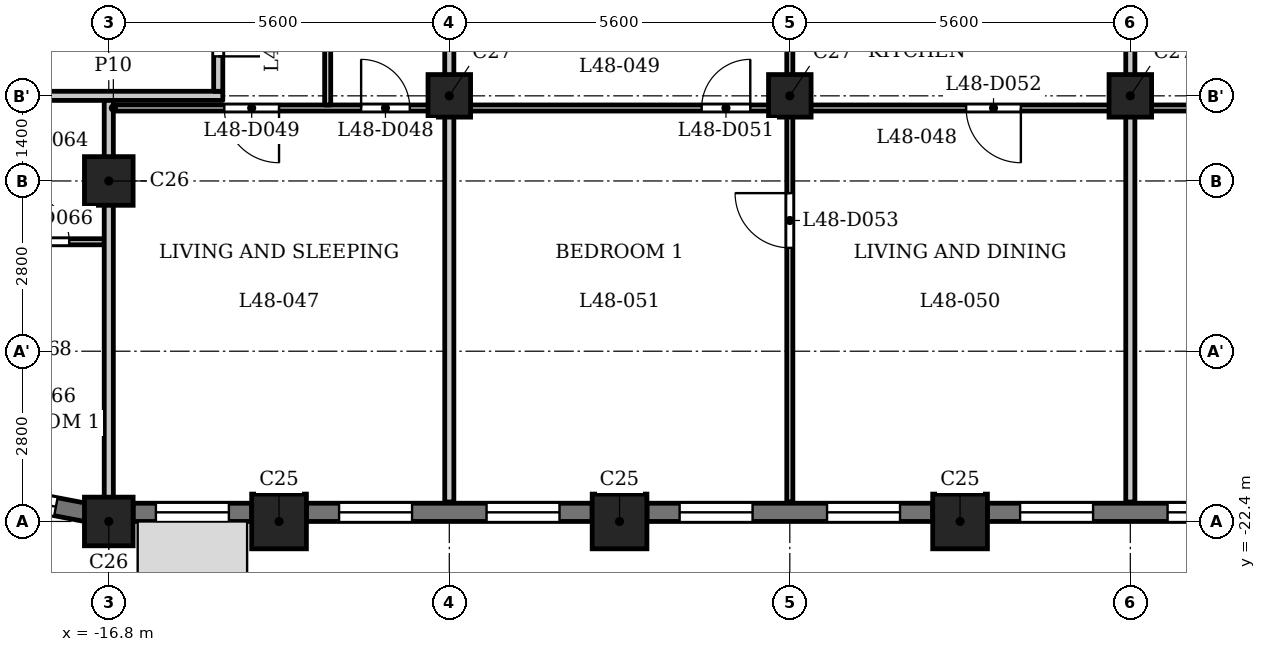
"""IFC4 building model, lengths in metres.
Left out: names, types, materials, properties, quantities, classifications, styles, units other than length and angle.
Written with IfcOpenShell. Run it as: python <this file> out.ifc"""

import sys

from ifc_helpers import new_model, si_unit, direction, frame, frame_2d, origin, origin_2d, place, context, subcontext, project, spatial, rectangle, extrude, element, fill, save


model = new_model("IFC4")
c1 = context("Model", 3, precision=1e-05, world=origin(), true_north=direction((0.0, 1.0)))
c2 = subcontext(c1, "Body", "Model", "MODEL_VIEW")
j1 = project(units=[si_unit("LENGTHUNIT", "METRE"), si_unit("PLANEANGLEUNIT", "RADIAN")], contexts=[c1])
p1 = place(None, origin())
s1 = spatial("IfcSite", under=j1, at=p1, CompositionType="ELEMENT")
p2 = place(p1, origin())
s2 = spatial("IfcBuilding", under=s1, at=p2, CompositionType="ELEMENT")
p3 = place(p2, frame((0.0, 0.0, 188.9)))
s3 = spatial("IfcBuildingStorey", under=s2, at=p3, CompositionType="ELEMENT", Elevation=188.9)
for number, where, z_axis, x_axis in (
    (1, (-14.0, -22.4, 0.0), (0.0, 0.0, 1.0), (1.0, 0.0, 0.0)),
    (2, (-8.4, -22.4, 0.0), (0.0, 0.0, 1.0), (1.0, 0.0, 0.0)),
    (3, (-2.8, -22.4, 0.0), (0.0, 0.0, 1.0), (1.0, 0.0, 0.0)),
):
    element("IfcColumn", number, at=place(p3, frame(where, z_axis=z_axis, x_axis=x_axis)), inside=s3, PredefinedType="COLUMN", context=c2, shape_type="SweptSolid", body=[
        extrude(rectangle(XDim=0.9, YDim=0.9, at=origin_2d()), origin(), (0.0, 0.0, 1.0), 3.5),
    ])
for number, where, z_axis, x_axis in (
    (4, (-16.8, -22.4, 0.0), (0.0, 0.0, 1.0), (1.0, 0.0, 0.0)),
    (5, (-16.8, -16.8, 0.0), (0.0, 0.0, 1.0), (1.0, 0.0, 0.0)),
):
    element("IfcColumn", number, at=place(p3, frame(where, z_axis=z_axis, x_axis=x_axis)), inside=s3, PredefinedType="COLUMN", context=c2, shape_type="SweptSolid", body=[
        extrude(rectangle(XDim=0.8, YDim=0.8, at=origin_2d()), origin(), (0.0, 0.0, 1.0), 3.5),
    ])
for number, where, z_axis, x_axis in (
    (6, (-11.2, -15.4, 0.0), (0.0, 0.0, 1.0), (1.0, 0.0, 0.0)),
    (7, (-5.6, -15.4, 0.0), (0.0, 0.0, 1.0), (1.0, 0.0, 0.0)),
    (8, (0.0, -15.4, 0.0), (0.0, 0.0, 1.0), (1.0, 0.0, 0.0)),
):
    element("IfcColumn", number, at=place(p3, frame(where, z_axis=z_axis, x_axis=x_axis)), inside=s3, PredefinedType="COLUMN", context=c2, shape_type="SweptSolid", body=[
        extrude(rectangle(XDim=0.7, YDim=0.7, at=origin_2d()), origin(), (0.0, 0.0, 1.0), 3.5),
    ])
p4 = place(p3, frame((-18.946, -21.914, 0.0), z_axis=(0.0, 0.0, 1.0), x_axis=(0.98230529033, -0.187286722942, 0.0)))
e9 = element("IfcWall", 9, at=p4, inside=s3, PredefinedType="SOLIDWALL", context=c2, shape_type="SweptSolid", body=[
    extrude(rectangle(XDim=1.799, YDim=0.3, at=frame_2d((0.899, 0.0))), origin(), (0.0, 0.0, 1.0), 2.5),
])
p5 = place(p4, frame((0.5, 0.0, 0.6)))
e10 = element("IfcOpeningElement", 10, at=p5, cuts=e9, PredefinedType="OPENING", context=c2, shape_type="SweptSolid", body=[
    extrude(rectangle(XDim=0.8, YDim=1.55, at=frame_2d((0.4, 0.775))), frame((0.0, 0.16, 0.0), z_axis=(0.0, -1.0, 0.0), x_axis=(1.0, 0.0, 0.0)), (0.0, 0.0, 1.0), 0.32),
])
p6 = place(p3, frame((-16.4, -22.25, 0.0), z_axis=(0.0, 0.0, 1.0), x_axis=(1.0, 0.0, 0.0)))
e11 = element("IfcWall", 11, at=p6, inside=s3, PredefinedType="SOLIDWALL", context=c2, shape_type="SweptSolid", body=[
    extrude(rectangle(XDim=1.95, YDim=0.3, at=frame_2d((0.975, 0.0))), origin(), (0.0, 0.0, 1.0), 2.5),
])
p7 = place(p6, frame((0.375, 0.0, 0.6)))
e12 = element("IfcOpeningElement", 12, at=p7, cuts=e11, PredefinedType="OPENING", context=c2, shape_type="SweptSolid", body=[
    extrude(rectangle(XDim=1.2, YDim=1.55, at=frame_2d((0.6, 0.775))), frame((0.0, 0.16, 0.0), z_axis=(0.0, -1.0, 0.0), x_axis=(1.0, 0.0, 0.0)), (0.0, 0.0, 1.0), 0.32),
])
p8 = place(p3, frame((-13.55, -22.25, 0.0), z_axis=(0.0, 0.0, 1.0), x_axis=(1.0, 0.0, 0.0)))
e13 = element("IfcWall", 13, at=p8, inside=s3, PredefinedType="SOLIDWALL", context=c2, shape_type="SweptSolid", body=[
    extrude(rectangle(XDim=4.7, YDim=0.3, at=frame_2d((2.35, 0.0))), origin(), (0.0, 0.0, 1.0), 2.5),
])
p9 = place(p8, frame((0.538, 0.0, 0.6)))
e14 = element("IfcOpeningElement", 14, at=p9, cuts=e13, PredefinedType="OPENING", context=c2, shape_type="SweptSolid", body=[
    extrude(rectangle(XDim=1.2, YDim=1.55, at=frame_2d((0.6, 0.775))), frame((0.0, 0.16, 0.0), z_axis=(0.0, -1.0, 0.0), x_axis=(1.0, 0.0, 0.0)), (0.0, 0.0, 1.0), 0.32),
])
p10 = place(p8, frame((2.962, 0.0, 0.6)))
e15 = element("IfcOpeningElement", 15, at=p10, cuts=e13, PredefinedType="OPENING", context=c2, shape_type="SweptSolid", body=[
    extrude(rectangle(XDim=1.2, YDim=1.55, at=frame_2d((0.6, 0.775))), frame((0.0, 0.16, 0.0), z_axis=(0.0, -1.0, 0.0), x_axis=(1.0, 0.0, 0.0)), (0.0, 0.0, 1.0), 0.32),
])
p11 = place(p3, frame((-7.95, -22.25, 0.0), z_axis=(0.0, 0.0, 1.0), x_axis=(1.0, 0.0, 0.0)))
e16 = element("IfcWall", 16, at=p11, inside=s3, PredefinedType="SOLIDWALL", context=c2, shape_type="SweptSolid", body=[
    extrude(rectangle(XDim=4.7, YDim=0.3, at=frame_2d((2.35, 0.0))), origin(), (0.0, 0.0, 1.0), 2.5),
])
p12 = place(p11, frame((0.538, 0.0, 0.6)))
e17 = element("IfcOpeningElement", 17, at=p12, cuts=e16, PredefinedType="OPENING", context=c2, shape_type="SweptSolid", body=[
    extrude(rectangle(XDim=1.2, YDim=1.55, at=frame_2d((0.6, 0.775))), frame((0.0, 0.16, 0.0), z_axis=(0.0, -1.0, 0.0), x_axis=(1.0, 0.0, 0.0)), (0.0, 0.0, 1.0), 0.32),
])
p13 = place(p11, frame((2.962, 0.0, 0.6)))
e18 = element("IfcOpeningElement", 18, at=p13, cuts=e16, PredefinedType="OPENING", context=c2, shape_type="SweptSolid", body=[
    extrude(rectangle(XDim=1.2, YDim=1.55, at=frame_2d((0.6, 0.775))), frame((0.0, 0.16, 0.0), z_axis=(0.0, -1.0, 0.0), x_axis=(1.0, 0.0, 0.0)), (0.0, 0.0, 1.0), 0.32),
])
p14 = place(p3, frame((-2.35, -22.25, 0.0), z_axis=(0.0, 0.0, 1.0), x_axis=(1.0, 0.0, 0.0)))
e19 = element("IfcWall", 19, at=p14, inside=s3, PredefinedType="SOLIDWALL", context=c2, shape_type="SweptSolid", body=[
    extrude(rectangle(XDim=4.7, YDim=0.3, at=frame_2d((2.35, 0.0))), origin(), (0.0, 0.0, 1.0), 2.5),
])
p15 = place(p14, frame((0.538, 0.0, 0.6)))
e20 = element("IfcOpeningElement", 20, at=p15, cuts=e19, PredefinedType="OPENING", context=c2, shape_type="SweptSolid", body=[
    extrude(rectangle(XDim=1.2, YDim=1.55, at=frame_2d((0.6, 0.775))), frame((0.0, 0.16, 0.0), z_axis=(0.0, -1.0, 0.0), x_axis=(1.0, 0.0, 0.0)), (0.0, 0.0, 1.0), 0.32),
])
p16 = place(p14, frame((2.962, 0.0, 0.6)))
e21 = element("IfcOpeningElement", 21, at=p16, cuts=e19, PredefinedType="OPENING", context=c2, shape_type="SweptSolid", body=[
    extrude(rectangle(XDim=1.2, YDim=1.55, at=frame_2d((0.6, 0.775))), frame((0.0, 0.16, 0.0), z_axis=(0.0, -1.0, 0.0), x_axis=(1.0, 0.0, 0.0)), (0.0, 0.0, 1.0), 0.32),
])
p17 = place(p3, frame((-23.594, -17.8, 0.0), z_axis=(0.0, 0.0, 1.0), x_axis=(1.0, 0.0, 0.0)))
e22 = element("IfcWall", 22, at=p17, inside=s3, PredefinedType="PARTITIONING", context=c2, shape_type="SweptSolid", body=[
    extrude(rectangle(XDim=6.719, YDim=0.1, at=frame_2d((3.359, 0.0))), origin(), (0.0, 0.0, 1.0), 3.2),
])
p18 = place(p17, frame((5.344, 0.0, 0.0)))
e23 = element("IfcOpeningElement", 23, at=p18, cuts=e22, PredefinedType="OPENING", context=c2, shape_type="SweptSolid", body=[
    extrude(rectangle(XDim=0.8, YDim=2.1, at=frame_2d((0.4, 1.05))), frame((0.0, 0.06, 0.0), z_axis=(0.0, -1.0, 0.0), x_axis=(1.0, 0.0, 0.0)), (0.0, 0.0, 1.0), 0.12),
])
p19 = place(p17, frame((1.126, 0.0, 0.0)))
e24 = element("IfcOpeningElement", 24, at=p19, cuts=e22, PredefinedType="OPENING", context=c2, shape_type="SweptSolid", body=[
    extrude(rectangle(XDim=0.9, YDim=2.1, at=frame_2d((0.45, 1.05))), frame((0.0, 0.06, 0.0), z_axis=(0.0, -1.0, 0.0), x_axis=(1.0, 0.0, 0.0)), (0.0, 0.0, 1.0), 0.12),
])
p20 = place(p3, frame((-16.725, -15.6, 0.0), z_axis=(0.0, 0.0, 1.0), x_axis=(1.0, 0.0, 0.0)))
e25 = element("IfcWall", 25, at=p20, inside=s3, PredefinedType="PARTITIONING", context=c2, shape_type="SweptSolid", body=[
    extrude(rectangle(XDim=33.45, YDim=0.1, at=frame_2d((16.725, 0.0))), origin(), (0.0, 0.0, 1.0), 3.2),
])
p21 = place(p20, frame((4.075, 0.0, 0.0)))
e26 = element("IfcOpeningElement", 26, at=p21, cuts=e25, PredefinedType="OPENING", context=c2, shape_type="SweptSolid", body=[
    extrude(rectangle(XDim=0.8, YDim=2.1, at=frame_2d((0.4, 1.05))), frame((0.0, 0.06, 0.0), z_axis=(0.0, -1.0, 0.0), x_axis=(1.0, 0.0, 0.0)), (0.0, 0.0, 1.0), 0.12),
])
p22 = place(p20, frame((1.825, 0.0, 0.0)))
e27 = element("IfcOpeningElement", 27, at=p22, cuts=e25, PredefinedType="OPENING", context=c2, shape_type="SweptSolid", body=[
    extrude(rectangle(XDim=0.9, YDim=2.1, at=frame_2d((0.45, 1.05))), frame((0.0, 0.06, 0.0), z_axis=(0.0, -1.0, 0.0), x_axis=(1.0, 0.0, 0.0)), (0.0, 0.0, 1.0), 0.12),
])
p23 = place(p20, frame((9.675, 0.0, 0.0)))
e28 = element("IfcOpeningElement", 28, at=p23, cuts=e25, PredefinedType="OPENING", context=c2, shape_type="SweptSolid", body=[
    extrude(rectangle(XDim=0.8, YDim=2.1, at=frame_2d((0.4, 1.05))), frame((0.0, 0.06, 0.0), z_axis=(0.0, -1.0, 0.0), x_axis=(1.0, 0.0, 0.0)), (0.0, 0.0, 1.0), 0.12),
])
p24 = place(p20, frame((14.025, 0.0, 0.0)))
e29 = element("IfcOpeningElement", 29, at=p24, cuts=e25, PredefinedType="OPENING", context=c2, shape_type="SweptSolid", body=[
    extrude(rectangle(XDim=0.9, YDim=2.1, at=frame_2d((0.45, 1.05))), frame((0.0, 0.06, 0.0), z_axis=(0.0, -1.0, 0.0), x_axis=(1.0, 0.0, 0.0)), (0.0, 0.0, 1.0), 0.12),
])
p25 = place(p20, frame((20.875, 0.0, 0.0)))
e30 = element("IfcOpeningElement", 30, at=p25, cuts=e25, PredefinedType="OPENING", context=c2, shape_type="SweptSolid", body=[
    extrude(rectangle(XDim=0.8, YDim=2.1, at=frame_2d((0.4, 1.05))), frame((0.0, 0.06, 0.0), z_axis=(0.0, -1.0, 0.0), x_axis=(1.0, 0.0, 0.0)), (0.0, 0.0, 1.0), 0.12),
])
p26 = place(p20, frame((25.225, 0.0, 0.0)))
e31 = element("IfcOpeningElement", 31, at=p26, cuts=e25, PredefinedType="OPENING", context=c2, shape_type="SweptSolid", body=[
    extrude(rectangle(XDim=0.9, YDim=2.1, at=frame_2d((0.45, 1.05))), frame((0.0, 0.06, 0.0), z_axis=(0.0, -1.0, 0.0), x_axis=(1.0, 0.0, 0.0)), (0.0, 0.0, 1.0), 0.12),
])
p27 = place(p20, frame((28.475, 0.0, 0.0)))
e32 = element("IfcOpeningElement", 32, at=p27, cuts=e25, PredefinedType="OPENING", context=c2, shape_type="SweptSolid", body=[
    extrude(rectangle(XDim=0.8, YDim=2.1, at=frame_2d((0.4, 1.05))), frame((0.0, 0.06, 0.0), z_axis=(0.0, -1.0, 0.0), x_axis=(1.0, 0.0, 0.0)), (0.0, 0.0, 1.0), 0.12),
])
p28 = place(p20, frame((30.675, 0.0, 0.0)))
e33 = element("IfcOpeningElement", 33, at=p28, cuts=e25, PredefinedType="OPENING", context=c2, shape_type="SweptSolid", body=[
    extrude(rectangle(XDim=0.9, YDim=2.1, at=frame_2d((0.45, 1.05))), frame((0.0, 0.06, 0.0), z_axis=(0.0, -1.0, 0.0), x_axis=(1.0, 0.0, 0.0)), (0.0, 0.0, 1.0), 0.12),
])
p29 = place(p3, frame((-24.684, -15.4, 0.0), z_axis=(0.0, 0.0, 1.0), x_axis=(1.0, 0.0, 0.0)))
e34 = element("IfcWall", 34, at=p29, inside=s3, PredefinedType="PARTITIONING", context=c2, shape_type="SweptSolid", body=[
    extrude(rectangle(XDim=9.759, YDim=0.15, at=frame_2d((4.879, 0.0))), origin(), (0.0, 0.0, 1.0), 3.2),
])
p30 = place(p29, frame((1.143, 0.0, 0.0)))
e35 = element("IfcOpeningElement", 35, at=p30, cuts=e34, PredefinedType="OPENING", context=c2, shape_type="SweptSolid", body=[
    extrude(rectangle(XDim=1.0, YDim=2.1, at=frame_2d((0.5, 1.05))), frame((0.0, 0.085, 0.0), z_axis=(0.0, -1.0, 0.0), x_axis=(1.0, 0.0, 0.0)), (0.0, 0.0, 1.0), 0.17),
])
p31 = place(p3, frame((-16.8, -22.31, 0.0), z_axis=(0.0, 0.0, 1.0), x_axis=(0.0, 1.0, 0.0)))
e36 = element("IfcWall", 36, at=p31, inside=s3, PredefinedType="PARTITIONING", context=c2, shape_type="SweptSolid", body=[
    extrude(rectangle(XDim=6.835, YDim=0.15, at=frame_2d((3.417, 0.0))), origin(), (0.0, 0.0, 1.0), 2.55),
])
p32 = place(p3, frame((-15.0, -15.325, 0.0), z_axis=(0.0, 0.0, 1.0), x_axis=(0.0, 1.0, 0.0)))
e37 = element("IfcWall", 37, at=p32, inside=s3, PredefinedType="PARTITIONING", context=c2, shape_type="SweptSolid", body=[
    extrude(rectangle(XDim=2.05, YDim=0.15, at=frame_2d((1.025, 0.0))), origin(), (0.0, 0.0, 1.0), 3.2),
])
p33 = place(p32, frame((0.574, 0.0, 0.0)))
e38 = element("IfcOpeningElement", 38, at=p33, cuts=e37, PredefinedType="OPENING", context=c2, shape_type="SweptSolid", body=[
    extrude(rectangle(XDim=1.0, YDim=2.1, at=frame_2d((0.5, 1.05))), frame((0.0, 0.085, 0.0), z_axis=(0.0, -1.0, 0.0), x_axis=(1.0, 0.0, 0.0)), (0.0, 0.0, 1.0), 0.17),
])
p34 = place(p3, frame((-13.2, -15.55, 0.0), z_axis=(0.0, 0.0, 1.0), x_axis=(0.0, 1.0, 0.0)))
e39 = element("IfcWall", 39, at=p34, inside=s3, PredefinedType="PARTITIONING", context=c2, shape_type="SweptSolid", body=[
    extrude(rectangle(XDim=2.275, YDim=0.1, at=frame_2d((1.138, 0.0))), origin(), (0.0, 0.0, 1.0), 3.2),
])
p35 = place(p3, frame((-11.2, -22.08, 0.0), z_axis=(0.0, 0.0, 1.0), x_axis=(0.0, 1.0, 0.0)))
e40 = element("IfcWall", 40, at=p35, inside=s3, PredefinedType="PARTITIONING", context=c2, shape_type="SweptSolid", body=[
    extrude(rectangle(XDim=6.43, YDim=0.15, at=frame_2d((3.215, 0.0))), origin(), (0.0, 0.0, 1.0), 3.2),
])
p36 = place(p3, frame((-11.2, -15.55, 0.0), z_axis=(0.0, 0.0, 1.0), x_axis=(0.0, 1.0, 0.0)))
e41 = element("IfcWall", 41, at=p36, inside=s3, PredefinedType="PARTITIONING", context=c2, shape_type="SweptSolid", body=[
    extrude(rectangle(XDim=2.275, YDim=0.15, at=frame_2d((1.138, 0.0))), origin(), (0.0, 0.0, 1.0), 3.2),
])
p37 = place(p3, frame((-5.6, -22.08, 0.0), z_axis=(0.0, 0.0, 1.0), x_axis=(0.0, 1.0, 0.0)))
e42 = element("IfcWall", 42, at=p37, inside=s3, PredefinedType="PARTITIONING", context=c2, shape_type="SweptSolid", body=[
    extrude(rectangle(XDim=6.43, YDim=0.1, at=frame_2d((3.215, 0.0))), origin(), (0.0, 0.0, 1.0), 3.2),
])
p38 = place(p37, frame((4.18, 0.0, 0.0)))
e43 = element("IfcOpeningElement", 43, at=p38, cuts=e42, PredefinedType="OPENING", context=c2, shape_type="SweptSolid", body=[
    extrude(rectangle(XDim=0.9, YDim=2.1, at=frame_2d((0.45, 1.05))), frame((0.0, 0.06, 0.0), z_axis=(0.0, -1.0, 0.0), x_axis=(1.0, 0.0, 0.0)), (0.0, 0.0, 1.0), 0.12),
])
p39 = place(p3, frame((-5.6, -15.55, 0.0), z_axis=(0.0, 0.0, 1.0), x_axis=(0.0, 1.0, 0.0)))
e44 = element("IfcWall", 44, at=p39, inside=s3, PredefinedType="PARTITIONING", context=c2, shape_type="SweptSolid", body=[
    extrude(rectangle(XDim=2.275, YDim=0.1, at=frame_2d((1.138, 0.0))), origin(), (0.0, 0.0, 1.0), 3.2),
])
p40 = place(p3, frame((0.0, -22.08, 0.0), z_axis=(0.0, 0.0, 1.0), x_axis=(0.0, 1.0, 0.0)))
e45 = element("IfcWall", 45, at=p40, inside=s3, PredefinedType="PARTITIONING", context=c2, shape_type="SweptSolid", body=[
    extrude(rectangle(XDim=6.43, YDim=0.15, at=frame_2d((3.215, 0.0))), origin(), (0.0, 0.0, 1.0), 3.2),
])
p41 = place(p3, frame((0.0, -15.55, 0.0), z_axis=(0.0, 0.0, 1.0), x_axis=(0.0, 1.0, 0.0)))
e46 = element("IfcWall", 46, at=p41, inside=s3, PredefinedType="PARTITIONING", context=c2, shape_type="SweptSolid", body=[
    extrude(rectangle(XDim=2.275, YDim=0.15, at=frame_2d((1.138, 0.0))), origin(), (0.0, 0.0, 1.0), 3.2),
])
p42 = place(p33, origin())
e47 = element("IfcDoor", 47, at=p42, inside=s3, OperationType="SINGLE_SWING_LEFT", PredefinedType="DOOR", context=c2, shape_type="SweptSolid", body=[
    extrude(rectangle(XDim=1.0, YDim=2.1, at=frame_2d((0.5, 1.05))), frame((0.0, 0.025, 0.0), z_axis=(0.0, -1.0, 0.0), x_axis=(1.0, 0.0, 0.0)), (0.0, 0.0, 1.0), 0.05),
])
fill(e38, e47)
p43 = place(p21, origin())
e48 = element("IfcDoor", 48, at=p43, inside=s3, OperationType="SINGLE_SWING_RIGHT", PredefinedType="DOOR", context=c2, shape_type="SweptSolid", body=[
    extrude(rectangle(XDim=0.8, YDim=2.1, at=frame_2d((0.4, 1.05))), frame((0.0, 0.025, 0.0), z_axis=(0.0, -1.0, 0.0), x_axis=(1.0, 0.0, 0.0)), (0.0, 0.0, 1.0), 0.05),
])
fill(e26, e48)
p44 = place(p22, origin())
e49 = element("IfcDoor", 49, at=p44, inside=s3, OperationType="SINGLE_SWING_RIGHT", PredefinedType="DOOR", context=c2, shape_type="SweptSolid", body=[
    extrude(rectangle(XDim=0.9, YDim=2.1, at=frame_2d((0.45, 1.05))), frame((0.0, 0.025, 0.0), z_axis=(0.0, -1.0, 0.0), x_axis=(1.0, 0.0, 0.0)), (0.0, 0.0, 1.0), 0.05),
])
fill(e27, e49)
p45 = place(p23, origin())
e50 = element("IfcDoor", 50, at=p45, inside=s3, OperationType="SINGLE_SWING_LEFT", PredefinedType="DOOR", context=c2, shape_type="SweptSolid", body=[
    extrude(rectangle(XDim=0.8, YDim=2.1, at=frame_2d((0.4, 1.05))), frame((0.0, 0.025, 0.0), z_axis=(0.0, -1.0, 0.0), x_axis=(1.0, 0.0, 0.0)), (0.0, 0.0, 1.0), 0.05),
])
fill(e28, e50)
p46 = place(p24, origin())
e51 = element("IfcDoor", 51, at=p46, inside=s3, OperationType="SINGLE_SWING_RIGHT", PredefinedType="DOOR", context=c2, shape_type="SweptSolid", body=[
    extrude(rectangle(XDim=0.9, YDim=2.1, at=frame_2d((0.45, 1.05))), frame((0.0, 0.025, 0.0), z_axis=(0.0, -1.0, 0.0), x_axis=(1.0, 0.0, 0.0)), (0.0, 0.0, 1.0), 0.05),
])
fill(e29, e51)
p47 = place(p38, origin())
e52 = element("IfcDoor", 52, at=p47, inside=s3, OperationType="SINGLE_SWING_LEFT", PredefinedType="DOOR", context=c2, shape_type="SweptSolid", body=[
    extrude(rectangle(XDim=0.9, YDim=2.1, at=frame_2d((0.45, 1.05))), frame((0.0, 0.025, 0.0), z_axis=(0.0, -1.0, 0.0), x_axis=(1.0, 0.0, 0.0)), (0.0, 0.0, 1.0), 0.05),
])
fill(e43, e52)
p48 = place(p18, origin())
e53 = element("IfcDoor", 53, at=p48, inside=s3, OperationType="SINGLE_SWING_RIGHT", PredefinedType="DOOR", context=c2, shape_type="SweptSolid", body=[
    extrude(rectangle(XDim=0.8, YDim=2.1, at=frame_2d((0.4, 1.05))), frame((0.0, 0.025, 0.0), z_axis=(0.0, -1.0, 0.0), x_axis=(1.0, 0.0, 0.0)), (0.0, 0.0, 1.0), 0.05),
])
fill(e23, e53)
p49 = place(p5, origin())
e54 = element("IfcWindow", 54, at=p49, inside=s3, PartitioningType="SINGLE_PANEL", PredefinedType="WINDOW", context=c2, shape_type="SweptSolid", body=[
    extrude(rectangle(XDim=0.8, YDim=1.55, at=frame_2d((0.4, 0.775))), frame((0.0, 0.03, 0.0), z_axis=(0.0, -1.0, 0.0), x_axis=(1.0, 0.0, 0.0)), (0.0, 0.0, 1.0), 0.06),
])
fill(e10, e54)
p50 = place(p7, origin())
e55 = element("IfcWindow", 55, at=p50, inside=s3, PartitioningType="SINGLE_PANEL", PredefinedType="WINDOW", context=c2, shape_type="SweptSolid", body=[
    extrude(rectangle(XDim=1.2, YDim=1.55, at=frame_2d((0.6, 0.775))), frame((0.0, 0.03, 0.0), z_axis=(0.0, -1.0, 0.0), x_axis=(1.0, 0.0, 0.0)), (0.0, 0.0, 1.0), 0.06),
])
fill(e12, e55)
p51 = place(p9, origin())
e56 = element("IfcWindow", 56, at=p51, inside=s3, PartitioningType="SINGLE_PANEL", PredefinedType="WINDOW", context=c2, shape_type="SweptSolid", body=[
    extrude(rectangle(XDim=1.2, YDim=1.55, at=frame_2d((0.6, 0.775))), frame((0.0, 0.03, 0.0), z_axis=(0.0, -1.0, 0.0), x_axis=(1.0, 0.0, 0.0)), (0.0, 0.0, 1.0), 0.06),
])
fill(e14, e56)
p52 = place(p10, origin())
e57 = element("IfcWindow", 57, at=p52, inside=s3, PartitioningType="SINGLE_PANEL", PredefinedType="WINDOW", context=c2, shape_type="SweptSolid", body=[
    extrude(rectangle(XDim=1.2, YDim=1.55, at=frame_2d((0.6, 0.775))), frame((0.0, 0.03, 0.0), z_axis=(0.0, -1.0, 0.0), x_axis=(1.0, 0.0, 0.0)), (0.0, 0.0, 1.0), 0.06),
])
fill(e15, e57)
p53 = place(p12, origin())
e58 = element("IfcWindow", 58, at=p53, inside=s3, PartitioningType="SINGLE_PANEL", PredefinedType="WINDOW", context=c2, shape_type="SweptSolid", body=[
    extrude(rectangle(XDim=1.2, YDim=1.55, at=frame_2d((0.6, 0.775))), frame((0.0, 0.03, 0.0), z_axis=(0.0, -1.0, 0.0), x_axis=(1.0, 0.0, 0.0)), (0.0, 0.0, 1.0), 0.06),
])
fill(e17, e58)
p54 = place(p13, origin())
e59 = element("IfcWindow", 59, at=p54, inside=s3, PartitioningType="SINGLE_PANEL", PredefinedType="WINDOW", context=c2, shape_type="SweptSolid", body=[
    extrude(rectangle(XDim=1.2, YDim=1.55, at=frame_2d((0.6, 0.775))), frame((0.0, 0.03, 0.0), z_axis=(0.0, -1.0, 0.0), x_axis=(1.0, 0.0, 0.0)), (0.0, 0.0, 1.0), 0.06),
])
fill(e18, e59)
p55 = place(p15, origin())
e60 = element("IfcWindow", 60, at=p55, inside=s3, PartitioningType="SINGLE_PANEL", PredefinedType="WINDOW", context=c2, shape_type="SweptSolid", body=[
    extrude(rectangle(XDim=1.2, YDim=1.55, at=frame_2d((0.6, 0.775))), frame((0.0, 0.03, 0.0), z_axis=(0.0, -1.0, 0.0), x_axis=(1.0, 0.0, 0.0)), (0.0, 0.0, 1.0), 0.06),
])
fill(e20, e60)
p56 = place(p16, origin())
e61 = element("IfcWindow", 61, at=p56, inside=s3, PartitioningType="SINGLE_PANEL", PredefinedType="WINDOW", context=c2, shape_type="SweptSolid", body=[
    extrude(rectangle(XDim=1.2, YDim=1.55, at=frame_2d((0.6, 0.775))), frame((0.0, 0.03, 0.0), z_axis=(0.0, -1.0, 0.0), x_axis=(1.0, 0.0, 0.0)), (0.0, 0.0, 1.0), 0.06),
])
fill(e21, e61)
save(model, sys.argv[1])
